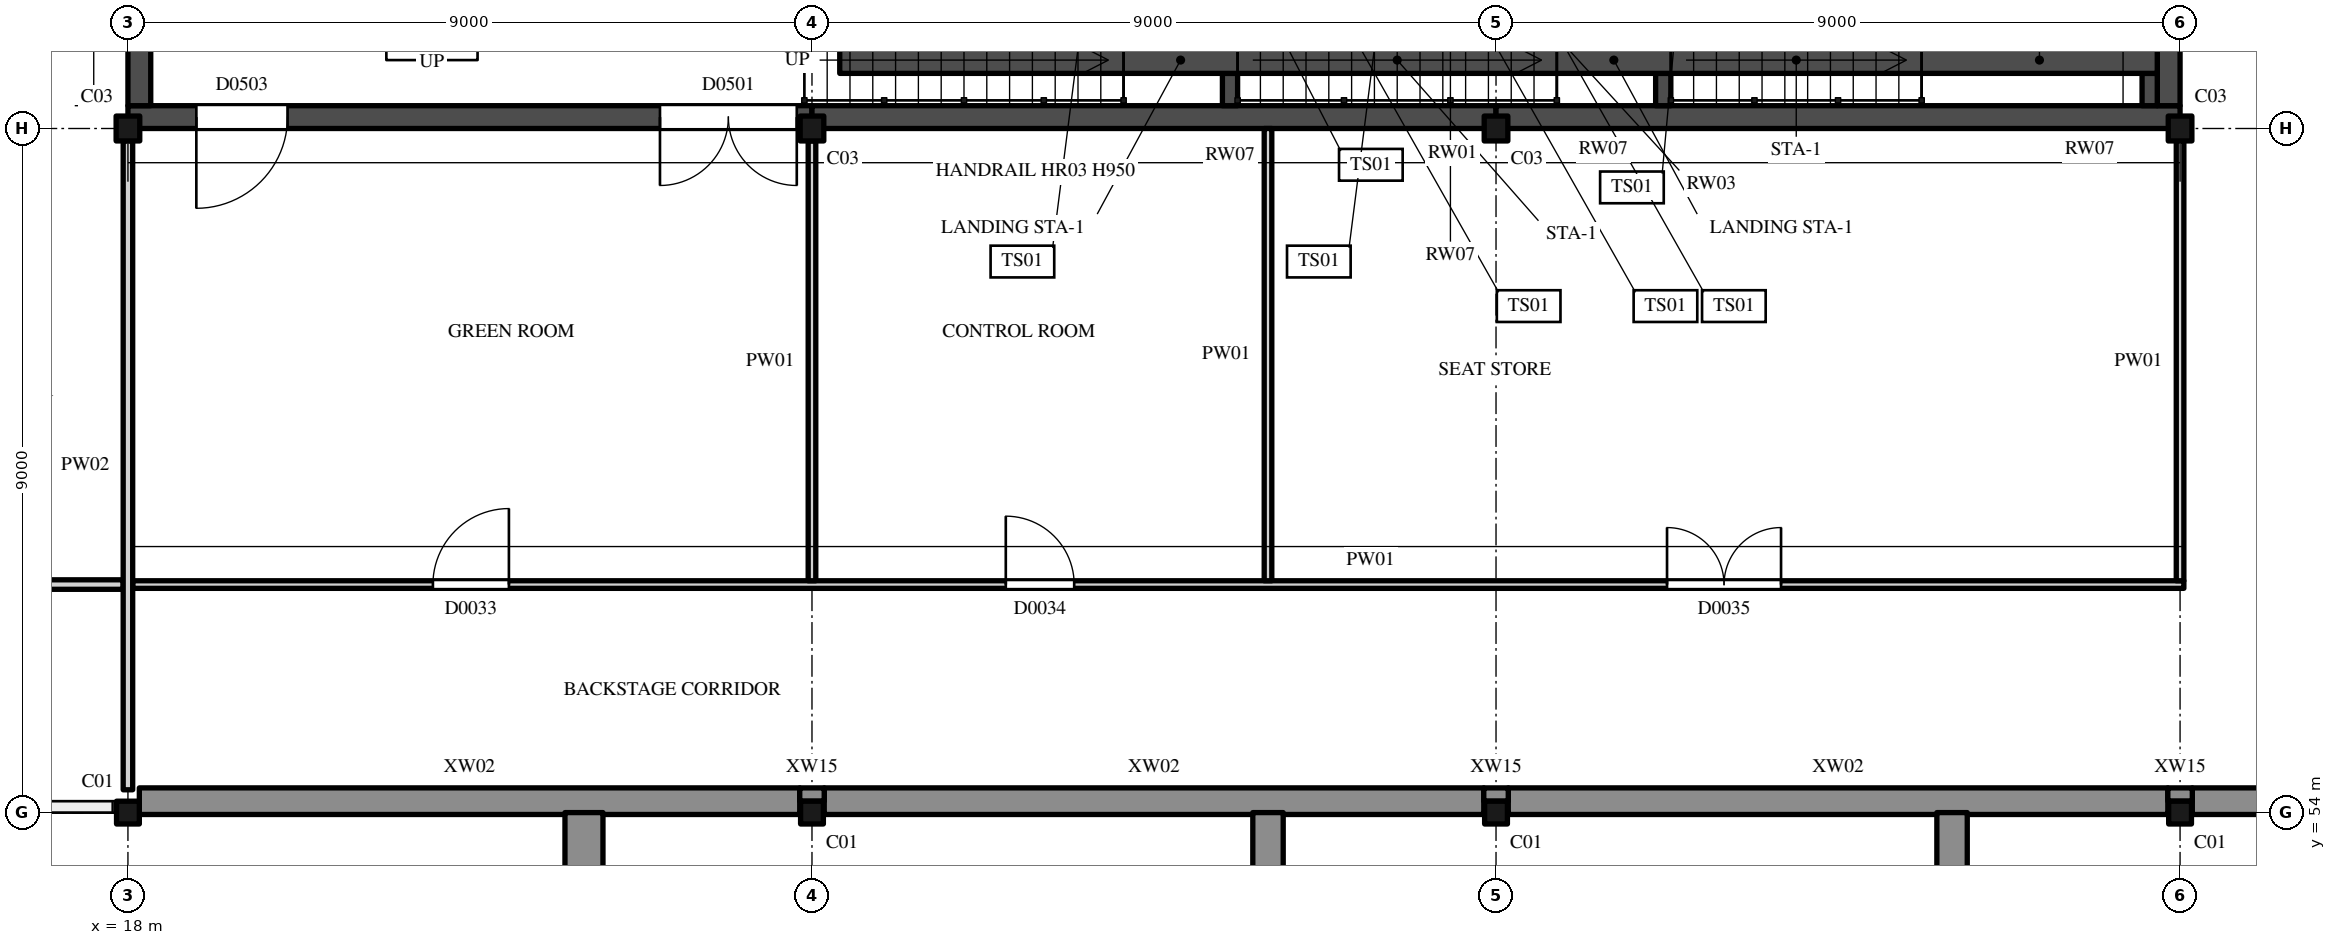
"""IFC4 building model, lengths in metres.
Left out: names, types, materials, properties, quantities, classifications, styles, units other than length and angle.
Written with IfcOpenShell. Run it as: python <this file> out.ifc"""

import sys

from ifc_helpers import new_model, si_unit, direction, frame, frame_2d, origin, origin_2d, place, context, subcontext, project, spatial, polyline, rectangle, hollow_rectangle, i_section, outline, extrude, element, fill, save


model = new_model("IFC4")
c1 = context("Model", 3, precision=1e-05, world=origin(), true_north=direction((0.0, 1.0)))
c2 = subcontext(c1, "Body", "Model", "MODEL_VIEW")
j1 = project(units=[si_unit("LENGTHUNIT", "METRE"), si_unit("PLANEANGLEUNIT", "RADIAN")], contexts=[c1])
p1 = place(None, origin())
s1 = spatial("IfcSite", under=j1, at=p1, CompositionType="ELEMENT")
p2 = place(p1, origin())
s2 = spatial("IfcBuilding", under=s1, at=p2, CompositionType="ELEMENT")
p3 = place(p2, origin())
s3 = spatial("IfcBuildingStorey", under=s2, at=p3, CompositionType="ELEMENT", Elevation=0.0)
for number, where, z_axis, x_axis in (
    (1, (18.0, 54.0, 0.0), (0.0, 0.0, 1.0), (1.0, 0.0, 0.0)),
    (2, (27.0, 54.0, 0.0), (0.0, 0.0, 1.0), (1.0, 0.0, 0.0)),
    (3, (36.0, 54.0, 0.0), (0.0, 0.0, 1.0), (1.0, 0.0, 0.0)),
    (4, (45.0, 54.0, 0.0), (0.0, 0.0, 1.0), (1.0, 0.0, 0.0)),
):
    element("IfcColumn", number, at=place(p3, frame(where, z_axis=z_axis, x_axis=x_axis)), inside=s3, PredefinedType="COLUMN", context=c2, shape_type="SweptSolid", body=[
        extrude(hollow_rectangle(XDim=0.3, YDim=0.3, WallThickness=0.012, InnerFilletRadius=0.019, OuterFilletRadius=0.031, at=origin_2d()), origin(), (0.0, 0.0, 1.0), 6.0),
    ])
for number, where, z_axis, x_axis in (
    (5, (18.0, 63.0, 0.0), (0.0, 0.0, 1.0), (1.0, 0.0, 0.0)),
    (6, (27.0, 63.0, 0.0), (0.0, 0.0, 1.0), (1.0, 0.0, 0.0)),
    (7, (36.0, 63.0, 0.0), (0.0, 0.0, 1.0), (1.0, 0.0, 0.0)),
    (8, (45.0, 63.0, 0.0), (0.0, 0.0, 1.0), (1.0, 0.0, 0.0)),
):
    element("IfcColumn", number, at=place(p3, frame(where, z_axis=z_axis, x_axis=x_axis)), inside=s3, PredefinedType="COLUMN", context=c2, shape_type="SweptSolid", body=[
        extrude(i_section(OverallWidth=0.311, OverallDepth=0.327, WebThickness=0.016, FlangeThickness=0.025, FilletRadius=0.017, at=origin_2d()), origin(), (0.0, 0.0, 1.0), 6.0),
    ])
p4 = place(p3, frame((18.0, 63.15, 0.0), z_axis=(0.0, 0.0, 1.0), x_axis=(1.0, 0.0, 0.0)))
e9 = element("IfcWall", 9, at=p4, inside=s3, PredefinedType="SHEAR", context=c2, shape_type="SweptSolid", body=[
    extrude(rectangle(XDim=9.0, YDim=0.3, at=frame_2d((4.5, 0.0))), origin(), (0.0, 0.0, 1.0), 6.0),
])
p5 = place(p4, frame((7.0, 0.0, 0.0)))
e10 = element("IfcOpeningElement", 10, at=p5, cuts=e9, PredefinedType="OPENING", context=c2, shape_type="SweptSolid", body=[
    extrude(rectangle(XDim=1.8, YDim=2.4, at=frame_2d((0.9, 1.2))), frame((0.0, 0.16, 0.0), z_axis=(0.0, -1.0, 0.0), x_axis=(1.0, 0.0, 0.0)), (0.0, 0.0, 1.0), 0.32),
])
p6 = place(p4, frame((0.9, 0.0, 0.0)))
e11 = element("IfcOpeningElement", 11, at=p6, cuts=e9, PredefinedType="OPENING", context=c2, shape_type="SweptSolid", body=[
    extrude(rectangle(XDim=1.2, YDim=2.1, at=frame_2d((0.6, 1.05))), frame((0.0, 0.16, 0.0), z_axis=(0.0, -1.0, 0.0), x_axis=(1.0, 0.0, 0.0)), (0.0, 0.0, 1.0), 0.32),
])
for number, where, z_axis, x_axis in (
    (12, (27.0, 63.15, 0.0), (0.0, 0.0, 1.0), (1.0, 0.0, 0.0)),
    (13, (36.0, 63.15, 0.0), (0.0, 0.0, 1.0), (1.0, 0.0, 0.0)),
):
    element("IfcWall", number, at=place(p3, frame(where, z_axis=z_axis, x_axis=x_axis)), inside=s3, PredefinedType="SHEAR", context=c2, shape_type="SweptSolid", body=[
        extrude(rectangle(XDim=9.0, YDim=0.3, at=frame_2d((4.5, 0.0))), origin(), (0.0, 0.0, 1.0), 6.0),
    ])
for number, where, z_axis, x_axis in (
    (14, (18.15, 63.3, 0.0), (0.0, 0.0, 1.0), (0.0, 1.0, 0.0)),
    (15, (44.85, 63.3, 0.0), (0.0, 0.0, 1.0), (0.0, 1.0, 0.0)),
):
    element("IfcWall", number, at=place(p3, frame(where, z_axis=z_axis, x_axis=x_axis)), inside=s3, PredefinedType="SHEAR", context=c2, shape_type="SweptSolid", body=[
        extrude(rectangle(XDim=8.7, YDim=0.3, at=frame_2d((4.35, 0.0))), origin(), (0.0, 0.0, 1.0), 6.0),
    ])
p7 = place(p3, frame((32.5, 63.3, 0.0), z_axis=(0.0, 0.0, 1.0), x_axis=(0.0, 1.0, 0.0)))
e16 = element("IfcWall", 16, at=p7, inside=s3, PredefinedType="SHEAR", context=c2, shape_type="SweptSolid", body=[
    extrude(rectangle(XDim=0.425, YDim=0.2, at=frame_2d((0.212, 0.0))), origin(), (0.0, 0.0, 1.0), 1.943),
])
p8 = place(p3, frame((38.2, 63.3, 0.0), z_axis=(0.0, 0.0, 1.0), x_axis=(0.0, 1.0, 0.0)))
e17 = element("IfcWall", 17, at=p8, inside=s3, PredefinedType="SHEAR", context=c2, shape_type="SweptSolid", body=[
    extrude(rectangle(XDim=0.425, YDim=0.2, at=frame_2d((0.212, 0.0))), origin(), (0.0, 0.0, 1.0), 4.086),
])
p9 = place(p3, frame((44.6, 63.3, 0.0), z_axis=(0.0, 0.0, 1.0), x_axis=(0.0, 1.0, 0.0)))
e18 = element("IfcWall", 18, at=p9, inside=s3, PredefinedType="SHEAR", context=c2, shape_type="SweptSolid", body=[
    extrude(rectangle(XDim=0.425, YDim=0.2, at=frame_2d((0.212, 0.0))), origin(), (0.0, 0.0, 1.0), 5.8),
])
p10 = place(p3, frame((27.365, 63.9, 0.0), z_axis=(0.0, 0.0, 1.0), x_axis=(1.0, 0.0, 0.0)))
e19 = element("IfcWall", 19, at=p10, inside=s3, PredefinedType="SHEAR", context=c2, shape_type="SweptSolid", body=[
    extrude(outline(polyline([(0.0, 0.0), (17.335, 0.0), (17.335, 5.8), (14.235, 5.8), (14.235, 5.635), (11.4, 4.286), (10.935, 4.086), (9.435, 4.086), (9.435, 3.921), (5.7, 2.143), (5.235, 1.943), (3.735, 1.943), (3.735, 1.779), (0.0, 0.0), (0.0, 0.0)])), frame((0.0, 0.175, 0.0), z_axis=(0.0, -1.0, 0.0), x_axis=(1.0, 0.0, 0.0)), (0.0, 0.0, 1.0), 0.35),
])
p11 = place(p3, frame((18.15, 54.15, 0.0), z_axis=(0.0, 0.0, 1.0), x_axis=(1.0, 0.0, 0.0)))
e20 = element("IfcWall", 20, at=p11, inside=s3, PredefinedType="SOLIDWALL", context=c2, shape_type="SweptSolid", body=[
    extrude(rectangle(XDim=8.689, YDim=0.35, at=frame_2d((4.345, 0.0))), origin(), (0.0, 0.0, 1.0), 5.469),
])
for number, where, z_axis, x_axis in (
    (21, (27.161, 54.15, 0.0), (0.0, 0.0, 1.0), (1.0, 0.0, 0.0)),
    (22, (36.161, 54.15, 0.0), (0.0, 0.0, 1.0), (1.0, 0.0, 0.0)),
):
    element("IfcWall", number, at=place(p3, frame(where, z_axis=z_axis, x_axis=x_axis)), inside=s3, PredefinedType="SOLIDWALL", context=c2, shape_type="SweptSolid", body=[
        extrude(rectangle(XDim=8.678, YDim=0.35, at=frame_2d((4.339, 0.0))), origin(), (0.0, 0.0, 1.0), 5.469),
    ])
p12 = place(p3, frame((45.161, 54.15, 0.0), z_axis=(0.0, 0.0, 1.0), x_axis=(1.0, 0.0, 0.0)))
e23 = element("IfcWall", 23, at=p12, inside=s3, PredefinedType="SOLIDWALL", context=c2, shape_type="SweptSolid", body=[
    extrude(rectangle(XDim=8.689, YDim=0.35, at=frame_2d((4.345, 0.0))), origin(), (0.0, 0.0, 1.0), 5.469),
])
for number, where, z_axis, x_axis in (
    (24, (26.839, 54.238, 0.0), (0.0, 0.0, 1.0), (1.0, 0.0, 0.0)),
    (25, (35.839, 54.238, 0.0), (0.0, 0.0, 1.0), (1.0, 0.0, 0.0)),
    (26, (44.839, 54.238, 0.0), (0.0, 0.0, 1.0), (1.0, 0.0, 0.0)),
):
    element("IfcWall", number, at=place(p3, frame(where, z_axis=z_axis, x_axis=x_axis)), inside=s3, PredefinedType="SOLIDWALL", context=c2, shape_type="SweptSolid", body=[
        extrude(rectangle(XDim=0.322, YDim=0.175, at=frame_2d((0.161, 0.0))), origin(), (0.0, 0.0, 1.0), 5.469),
    ])
p13 = place(p3, frame((24.0, 54.0, 0.0), z_axis=(0.0, 0.0, 1.0), x_axis=(0.0, -1.0, 0.0)))
e27 = element("IfcWall", 27, at=p13, inside=s3, PredefinedType="SOLIDWALL", context=c2, shape_type="SweptSolid", body=[
    extrude(outline(polyline([(0.0, 0.0), (2.7, 0.0), (2.7, 1.2), (0.0, 8.0), (0.0, 0.0)])), frame((0.0, 0.25, 0.0), z_axis=(0.0, -1.0, 0.0), x_axis=(1.0, 0.0, 0.0)), (0.0, 0.0, 1.0), 0.5),
])
p14 = place(p3, frame((33.0, 54.0, 0.0), z_axis=(0.0, 0.0, 1.0), x_axis=(0.0, -1.0, 0.0)))
e28 = element("IfcWall", 28, at=p14, inside=s3, PredefinedType="SOLIDWALL", context=c2, shape_type="SweptSolid", body=[
    extrude(outline(polyline([(0.0, 0.0), (2.4, 0.0), (2.4, 1.2), (0.0, 7.0), (0.0, 0.0)])), frame((0.0, 0.2, 0.0), z_axis=(0.0, -1.0, 0.0), x_axis=(1.0, 0.0, 0.0)), (0.0, 0.0, 1.0), 0.4),
])
p15 = place(p3, frame((42.0, 54.0, 0.0), z_axis=(0.0, 0.0, 1.0), x_axis=(0.0, -1.0, 0.0)))
e29 = element("IfcWall", 29, at=p15, inside=s3, PredefinedType="SOLIDWALL", context=c2, shape_type="SweptSolid", body=[
    extrude(outline(polyline([(0.0, 0.0), (1.8, 0.0), (1.8, 1.2), (0.0, 6.0), (0.0, 0.0)])), frame((0.0, 0.2, 0.0), z_axis=(0.0, -1.0, 0.0), x_axis=(1.0, 0.0, 0.0)), (0.0, 0.0, 1.0), 0.4),
])
p16 = place(p3, frame((8.4, 57.0, 0.0), z_axis=(0.0, 0.0, 1.0), x_axis=(1.0, 0.0, 0.0)))
e30 = element("IfcWall", 30, at=p16, inside=s3, PredefinedType="PARTITIONING", context=c2, shape_type="SweptSolid", body=[
    extrude(rectangle(XDim=9.538, YDim=0.125, at=frame_2d((4.769, 0.0))), origin(), (0.0, 0.0, 1.0), 5.469),
])
p17 = place(p16, frame((1.95, 0.0, 0.0)))
e31 = element("IfcOpeningElement", 31, at=p17, cuts=e30, PredefinedType="OPENING", context=c2, shape_type="SweptSolid", body=[
    extrude(rectangle(XDim=0.9, YDim=2.1, at=frame_2d((0.45, 1.05))), frame((0.0, 0.073, 0.0), z_axis=(0.0, -1.0, 0.0), x_axis=(1.0, 0.0, 0.0)), (0.0, 0.0, 1.0), 0.145),
])
p18 = place(p16, frame((6.45, 0.0, 0.0)))
e32 = element("IfcOpeningElement", 32, at=p18, cuts=e30, PredefinedType="OPENING", context=c2, shape_type="SweptSolid", body=[
    extrude(rectangle(XDim=0.9, YDim=2.1, at=frame_2d((0.45, 1.05))), frame((0.0, 0.073, 0.0), z_axis=(0.0, -1.0, 0.0), x_axis=(1.0, 0.0, 0.0)), (0.0, 0.0, 1.0), 0.145),
])
p19 = place(p3, frame((18.062, 57.0, 0.0), z_axis=(0.0, 0.0, 1.0), x_axis=(1.0, 0.0, 0.0)))
e33 = element("IfcWall", 33, at=p19, inside=s3, PredefinedType="PARTITIONING", context=c2, shape_type="SweptSolid", body=[
    extrude(rectangle(XDim=26.988, YDim=0.1, at=frame_2d((13.494, 0.0))), origin(), (0.0, 0.0, 1.0), 5.469),
])
p20 = place(p19, frame((3.95, 0.0, 0.0)))
e34 = element("IfcOpeningElement", 34, at=p20, cuts=e33, PredefinedType="OPENING", context=c2, shape_type="SweptSolid", body=[
    extrude(rectangle(XDim=1.0, YDim=2.1, at=frame_2d((0.5, 1.05))), frame((0.0, 0.06, 0.0), z_axis=(0.0, -1.0, 0.0), x_axis=(1.0, 0.0, 0.0)), (0.0, 0.0, 1.0), 0.12),
])
p21 = place(p19, frame((11.488, 0.0, 0.0)))
e35 = element("IfcOpeningElement", 35, at=p21, cuts=e33, PredefinedType="OPENING", context=c2, shape_type="SweptSolid", body=[
    extrude(rectangle(XDim=0.9, YDim=2.1, at=frame_2d((0.45, 1.05))), frame((0.0, 0.06, 0.0), z_axis=(0.0, -1.0, 0.0), x_axis=(1.0, 0.0, 0.0)), (0.0, 0.0, 1.0), 0.12),
])
p22 = place(p19, frame((20.188, 0.0, 0.0)))
e36 = element("IfcOpeningElement", 36, at=p22, cuts=e33, PredefinedType="OPENING", context=c2, shape_type="SweptSolid", body=[
    extrude(rectangle(XDim=1.5, YDim=2.4, at=frame_2d((0.75, 1.2))), frame((0.0, 0.06, 0.0), z_axis=(0.0, -1.0, 0.0), x_axis=(1.0, 0.0, 0.0)), (0.0, 0.0, 1.0), 0.12),
])
p23 = place(p3, frame((18.0, 54.3, 0.0), z_axis=(0.0, 0.0, 1.0), x_axis=(0.0, 1.0, 0.0)))
e37 = element("IfcWall", 37, at=p23, inside=s3, PredefinedType="PARTITIONING", context=c2, shape_type="SweptSolid", body=[
    extrude(rectangle(XDim=8.536, YDim=0.125, at=frame_2d((4.268, 0.0))), origin(), (0.0, 0.0, 1.0), 5.365),
])
p24 = place(p3, frame((27.0, 57.05, 0.0), z_axis=(0.0, 0.0, 1.0), x_axis=(0.0, 1.0, 0.0)))
e38 = element("IfcWall", 38, at=p24, inside=s3, PredefinedType="PARTITIONING", context=c2, shape_type="SweptSolid", body=[
    extrude(rectangle(XDim=5.786, YDim=0.1, at=frame_2d((2.893, 0.0))), origin(), (0.0, 0.0, 1.0), 5.365),
])
p25 = place(p3, frame((33.0, 57.05, 0.0), z_axis=(0.0, 0.0, 1.0), x_axis=(0.0, 1.0, 0.0)))
e39 = element("IfcWall", 39, at=p25, inside=s3, PredefinedType="PARTITIONING", context=c2, shape_type="SweptSolid", body=[
    extrude(rectangle(XDim=5.95, YDim=0.1, at=frame_2d((2.975, 0.0))), origin(), (0.0, 0.0, 1.0), 5.825),
])
p26 = place(p3, frame((45.0, 57.05, 0.0), z_axis=(0.0, 0.0, 1.0), x_axis=(0.0, 1.0, 0.0)))
e40 = element("IfcWall", 40, at=p26, inside=s3, PredefinedType="PARTITIONING", context=c2, shape_type="SweptSolid", body=[
    extrude(rectangle(XDim=5.786, YDim=0.1, at=frame_2d((2.893, 0.0))), origin(), (0.0, 0.0, 1.0), 5.365),
])
p27 = place(p5, origin())
e41 = element("IfcDoor", 41, at=p27, inside=s3, OperationType="DOUBLE_DOOR_SINGLE_SWING", PredefinedType="DOOR", context=c2, shape_type="SweptSolid", body=[
    extrude(rectangle(XDim=1.8, YDim=2.4, at=frame_2d((0.9, 1.2))), frame((0.0, 0.025, 0.0), z_axis=(0.0, -1.0, 0.0), x_axis=(1.0, 0.0, 0.0)), (0.0, 0.0, 1.0), 0.05),
])
fill(e10, e41)
p28 = place(p6, origin())
e42 = element("IfcDoor", 42, at=p28, inside=s3, OperationType="SINGLE_SWING_LEFT", PredefinedType="DOOR", context=c2, shape_type="SweptSolid", body=[
    extrude(rectangle(XDim=1.2, YDim=2.1, at=frame_2d((0.6, 1.05))), frame((0.0, 0.025, 0.0), z_axis=(0.0, -1.0, 0.0), x_axis=(1.0, 0.0, 0.0)), (0.0, 0.0, 1.0), 0.05),
])
fill(e11, e42)
p29 = place(p20, origin())
e43 = element("IfcDoor", 43, at=p29, inside=s3, OperationType="SINGLE_SWING_LEFT", PredefinedType="DOOR", context=c2, shape_type="SweptSolid", body=[
    extrude(rectangle(XDim=1.0, YDim=2.1, at=frame_2d((0.5, 1.05))), frame((0.0, 0.025, 0.0), z_axis=(0.0, -1.0, 0.0), x_axis=(1.0, 0.0, 0.0)), (0.0, 0.0, 1.0), 0.05),
])
fill(e34, e43)
p30 = place(p21, origin())
e44 = element("IfcDoor", 44, at=p30, inside=s3, OperationType="SINGLE_SWING_RIGHT", PredefinedType="DOOR", context=c2, shape_type="SweptSolid", body=[
    extrude(rectangle(XDim=0.9, YDim=2.1, at=frame_2d((0.45, 1.05))), frame((0.0, 0.025, 0.0), z_axis=(0.0, -1.0, 0.0), x_axis=(1.0, 0.0, 0.0)), (0.0, 0.0, 1.0), 0.05),
])
fill(e35, e44)
p31 = place(p22, origin())
e45 = element("IfcDoor", 45, at=p31, inside=s3, OperationType="DOUBLE_DOOR_SINGLE_SWING", PredefinedType="DOOR", context=c2, shape_type="SweptSolid", body=[
    extrude(rectangle(XDim=1.5, YDim=2.4, at=frame_2d((0.75, 1.2))), frame((0.0, 0.025, 0.0), z_axis=(0.0, -1.0, 0.0), x_axis=(1.0, 0.0, 0.0)), (0.0, 0.0, 1.0), 0.05),
])
fill(e36, e45)
save(model, sys.argv[1])
